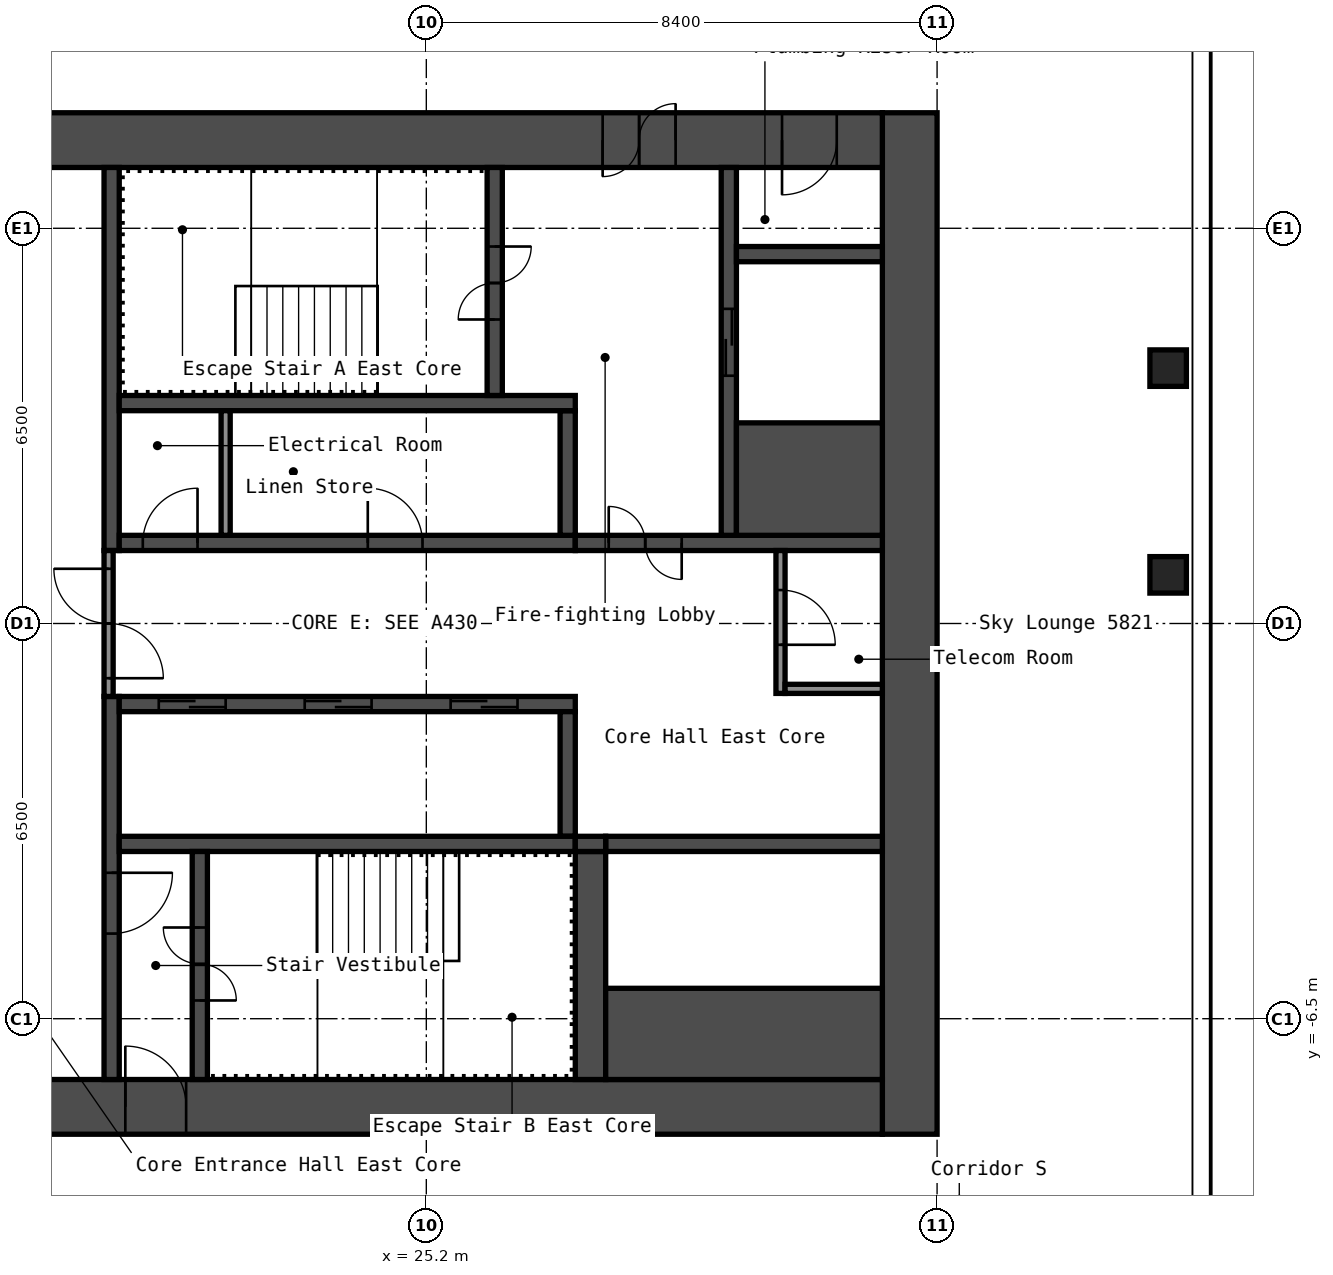
"""IFC4 building model, lengths in metres.
Left out: names, types, materials, properties, quantities, classifications, styles, units other than length and angle.
Written with IfcOpenShell. Run it as: python <this file> out.ifc"""

import sys

from ifc_helpers import new_model, si_unit, direction, frame, frame_2d, origin, origin_2d, place, context, subcontext, project, spatial, rectangle, hollow_rectangle, extrude, element, fill, save


model = new_model("IFC4")
c1 = context("Model", 3, precision=1e-05, world=origin(), true_north=direction((0.0, 1.0)))
c2 = subcontext(c1, "Body", "Model", "MODEL_VIEW")
j1 = project(units=[si_unit("LENGTHUNIT", "METRE"), si_unit("PLANEANGLEUNIT", "RADIAN")], contexts=[c1])
p1 = place(None, origin())
s1 = spatial("IfcSite", under=j1, at=p1, CompositionType="ELEMENT")
p2 = place(p1, origin())
s2 = spatial("IfcBuilding", under=s1, at=p2, CompositionType="ELEMENT")
p3 = place(p2, frame((0.0, 0.0, 205.8)))
s3 = spatial("IfcBuildingStorey", under=s2, at=p3, CompositionType="ELEMENT", Elevation=205.8)
for number, where, z_axis, x_axis in (
    (1, (37.4, 0.8, 0.0), (0.0, 0.0, 1.0), (1.0, 0.0, 0.0)),
    (2, (37.4, 4.2, 0.0), (0.0, 0.0, 1.0), (1.0, 0.0, 0.0)),
):
    element("IfcColumn", number, at=place(p3, frame(where, z_axis=z_axis, x_axis=x_axis)), inside=s3, PredefinedType="COLUMN", context=c2, shape_type="SweptSolid", body=[
        extrude(hollow_rectangle(XDim=0.6, YDim=0.6, WallThickness=0.025, InnerFilletRadius=0.038, OuterFilletRadius=0.062, at=origin_2d()), origin(), (0.0, 0.0, 1.0), 2.75),
    ])
p4 = place(p3, frame((33.15, -8.4, 0.0), z_axis=(0.0, 0.0, 1.0), x_axis=(0.0, 1.0, 0.0)))
e3 = element("IfcWall", 3, at=p4, inside=s3, PredefinedType="SHEAR", context=c2, shape_type="SweptSolid", body=[
    extrude(rectangle(XDim=16.8, YDim=0.9, at=frame_2d((8.4, 0.0))), origin(), (0.0, 0.0, 1.0), 2.75),
])
p5 = place(p3, frame((17.7, 7.95, 0.0), z_axis=(0.0, 0.0, 1.0), x_axis=(1.0, 0.0, 0.0)))
e4 = element("IfcWall", 4, at=p5, inside=s3, PredefinedType="SHEAR", context=c2, shape_type="SweptSolid", body=[
    extrude(rectangle(XDim=15.0, YDim=0.9, at=frame_2d((7.5, 0.0))), origin(), (0.0, 0.0, 1.0), 2.75),
])
p6 = place(p5, frame((10.4, 0.0, 0.0)))
e5 = element("IfcOpeningElement", 5, at=p6, cuts=e4, PredefinedType="OPENING", context=c2, shape_type="SweptSolid", body=[
    extrude(rectangle(XDim=1.2, YDim=2.1, at=frame_2d((0.6, 1.05))), frame((0.0, 0.46, 0.0), z_axis=(0.0, -1.0, 0.0), x_axis=(1.0, 0.0, 0.0)), (0.0, 0.0, 1.0), 0.92),
])
p7 = place(p5, frame((13.35, 0.0, 0.0)))
e6 = element("IfcOpeningElement", 6, at=p7, cuts=e4, PredefinedType="OPENING", context=c2, shape_type="SweptSolid", body=[
    extrude(rectangle(XDim=0.9, YDim=2.1, at=frame_2d((0.45, 1.05))), frame((0.0, 0.46, 0.0), z_axis=(0.0, -1.0, 0.0), x_axis=(1.0, 0.0, 0.0)), (0.0, 0.0, 1.0), 0.92),
])
p8 = place(p3, frame((17.7, -7.95, 0.0), z_axis=(0.0, 0.0, 1.0), x_axis=(1.0, 0.0, 0.0)))
e7 = element("IfcWall", 7, at=p8, inside=s3, PredefinedType="SHEAR", context=c2, shape_type="SweptSolid", body=[
    extrude(rectangle(XDim=15.0, YDim=0.9, at=frame_2d((7.5, 0.0))), origin(), (0.0, 0.0, 1.0), 2.75),
])
p9 = place(p8, frame((2.55, 0.0, 0.0)))
e8 = element("IfcOpeningElement", 8, at=p9, cuts=e7, PredefinedType="OPENING", context=c2, shape_type="SweptSolid", body=[
    extrude(rectangle(XDim=1.0, YDim=2.1, at=frame_2d((0.5, 1.05))), frame((0.0, 0.46, 0.0), z_axis=(0.0, -1.0, 0.0), x_axis=(1.0, 0.0, 0.0)), (0.0, 0.0, 1.0), 0.92),
])
p10 = place(p3, frame((20.025, 1.2, 0.0), z_axis=(0.0, 0.0, 1.0), x_axis=(0.0, 1.0, 0.0)))
e9 = element("IfcWall", 9, at=p10, inside=s3, PredefinedType="SHEAR", context=c2, shape_type="SweptSolid", body=[
    extrude(rectangle(XDim=6.3, YDim=0.25, at=frame_2d((3.15, 0.0))), origin(), (0.0, 0.0, 1.0), 2.75),
])
p11 = place(p3, frame((20.025, -7.5, 0.0), z_axis=(0.0, 0.0, 1.0), x_axis=(0.0, 1.0, 0.0)))
e10 = element("IfcWall", 10, at=p11, inside=s3, PredefinedType="SHEAR", context=c2, shape_type="SweptSolid", body=[
    extrude(rectangle(XDim=6.3, YDim=0.25, at=frame_2d((3.15, 0.0))), origin(), (0.0, 0.0, 1.0), 2.75),
])
p12 = place(p11, frame((2.4, 0.0, 0.0)))
e11 = element("IfcOpeningElement", 11, at=p12, cuts=e10, PredefinedType="OPENING", context=c2, shape_type="SweptSolid", body=[
    extrude(rectangle(XDim=1.0, YDim=2.1, at=frame_2d((0.5, 1.05))), frame((0.0, 0.135, 0.0), z_axis=(0.0, -1.0, 0.0), x_axis=(1.0, 0.0, 0.0)), (0.0, 0.0, 1.0), 0.27),
])
p13 = place(p3, frame((20.15, 1.325, 0.0), z_axis=(0.0, 0.0, 1.0), x_axis=(1.0, 0.0, 0.0)))
e12 = element("IfcWall", 12, at=p13, inside=s3, PredefinedType="SHEAR", context=c2, shape_type="SweptSolid", body=[
    extrude(rectangle(XDim=7.5, YDim=0.25, at=frame_2d((3.75, 0.0))), origin(), (0.0, 0.0, 1.0), 2.75),
])
p14 = place(p13, frame((0.387, 0.0, 0.0)))
e13 = element("IfcOpeningElement", 13, at=p14, cuts=e12, PredefinedType="OPENING", context=c2, shape_type="SweptSolid", body=[
    extrude(rectangle(XDim=0.9, YDim=2.1, at=frame_2d((0.45, 1.05))), frame((0.0, 0.135, 0.0), z_axis=(0.0, -1.0, 0.0), x_axis=(1.0, 0.0, 0.0)), (0.0, 0.0, 1.0), 0.27),
])
p15 = place(p13, frame((4.087, 0.0, 0.0)))
e14 = element("IfcOpeningElement", 14, at=p15, cuts=e12, PredefinedType="OPENING", context=c2, shape_type="SweptSolid", body=[
    extrude(rectangle(XDim=0.9, YDim=2.1, at=frame_2d((0.45, 1.05))), frame((0.0, 0.135, 0.0), z_axis=(0.0, -1.0, 0.0), x_axis=(1.0, 0.0, 0.0)), (0.0, 0.0, 1.0), 0.27),
])
p16 = place(p3, frame((27.525, 1.45, 0.0), z_axis=(0.0, 0.0, 1.0), x_axis=(0.0, 1.0, 0.0)))
e15 = element("IfcWall", 15, at=p16, inside=s3, PredefinedType="SHEAR", context=c2, shape_type="SweptSolid", body=[
    extrude(rectangle(XDim=2.05, YDim=0.25, at=frame_2d((1.025, 0.0))), origin(), (0.0, 0.0, 1.0), 2.75),
])
p17 = place(p3, frame((20.15, 3.625, 0.0), z_axis=(0.0, 0.0, 1.0), x_axis=(1.0, 0.0, 0.0)))
e16 = element("IfcWall", 16, at=p17, inside=s3, PredefinedType="SHEAR", context=c2, shape_type="SweptSolid", body=[
    extrude(rectangle(XDim=7.5, YDim=0.25, at=frame_2d((3.75, 0.0))), origin(), (0.0, 0.0, 1.0), 2.75),
])
p18 = place(p3, frame((26.325, 3.75, 0.0), z_axis=(0.0, 0.0, 1.0), x_axis=(0.0, 1.0, 0.0)))
e17 = element("IfcWall", 17, at=p18, inside=s3, PredefinedType="SHEAR", context=c2, shape_type="SweptSolid", body=[
    extrude(rectangle(XDim=3.75, YDim=0.25, at=frame_2d((1.875, 0.0))), origin(), (0.0, 0.0, 1.0), 2.75),
])
p19 = place(p18, frame((1.25, 0.0, 0.0)))
e18 = element("IfcOpeningElement", 18, at=p19, cuts=e17, PredefinedType="OPENING", context=c2, shape_type="SweptSolid", body=[
    extrude(rectangle(XDim=1.2, YDim=2.1, at=frame_2d((0.6, 1.05))), frame((0.0, 0.135, 0.0), z_axis=(0.0, -1.0, 0.0), x_axis=(1.0, 0.0, 0.0)), (0.0, 0.0, 1.0), 0.27),
])
p20 = place(p3, frame((27.65, 1.325, 0.0), z_axis=(0.0, 0.0, 1.0), x_axis=(1.0, 0.0, 0.0)))
e19 = element("IfcWall", 19, at=p20, inside=s3, PredefinedType="SHEAR", context=c2, shape_type="SweptSolid", body=[
    extrude(rectangle(XDim=5.05, YDim=0.25, at=frame_2d((2.525, 0.0))), origin(), (0.0, 0.0, 1.0), 2.75),
])
p21 = place(p20, frame((0.55, 0.0, 0.0)))
e20 = element("IfcOpeningElement", 20, at=p21, cuts=e19, PredefinedType="OPENING", context=c2, shape_type="SweptSolid", body=[
    extrude(rectangle(XDim=1.2, YDim=2.1, at=frame_2d((0.6, 1.05))), frame((0.0, 0.135, 0.0), z_axis=(0.0, -1.0, 0.0), x_axis=(1.0, 0.0, 0.0)), (0.0, 0.0, 1.0), 0.27),
])
p22 = place(p3, frame((30.175, 1.45, 0.0), z_axis=(0.0, 0.0, 1.0), x_axis=(0.0, 1.0, 0.0)))
e21 = element("IfcWall", 21, at=p22, inside=s3, PredefinedType="SHEAR", context=c2, shape_type="SweptSolid", body=[
    extrude(rectangle(XDim=6.05, YDim=0.25, at=frame_2d((3.025, 0.0))), origin(), (0.0, 0.0, 1.0), 2.75),
])
p23 = place(p22, frame((2.625, 0.0, 0.0)))
e22 = element("IfcOpeningElement", 22, at=p23, cuts=e21, PredefinedType="OPENING", context=c2, shape_type="SweptSolid", body=[
    extrude(rectangle(XDim=1.1, YDim=2.1, at=frame_2d((0.55, 1.05))), frame((0.0, 0.135, 0.0), z_axis=(0.0, -1.0, 0.0), x_axis=(1.0, 0.0, 0.0)), (0.0, 0.0, 1.0), 0.27),
])
p24 = place(p3, frame((30.3, 2.375, 0.0), z_axis=(0.0, 0.0, 1.0), x_axis=(1.0, 0.0, 0.0)))
e23 = element("IfcWall", 23, at=p24, inside=s3, PredefinedType="SHEAR", context=c2, shape_type="SweptSolid", body=[
    extrude(rectangle(XDim=2.4, YDim=1.85, at=frame_2d((1.2, 0.0))), origin(), (0.0, 0.0, 1.0), 2.75),
])
p25 = place(p3, frame((30.3, 6.075, 0.0), z_axis=(0.0, 0.0, 1.0), x_axis=(1.0, 0.0, 0.0)))
e24 = element("IfcWall", 24, at=p25, inside=s3, PredefinedType="SHEAR", context=c2, shape_type="SweptSolid", body=[
    extrude(rectangle(XDim=2.4, YDim=0.25, at=frame_2d((1.2, 0.0))), origin(), (0.0, 0.0, 1.0), 2.75),
])
p26 = place(p3, frame((20.15, -1.325, 0.0), z_axis=(0.0, 0.0, 1.0), x_axis=(1.0, 0.0, 0.0)))
e25 = element("IfcWall", 25, at=p26, inside=s3, PredefinedType="SHEAR", context=c2, shape_type="SweptSolid", body=[
    extrude(rectangle(XDim=7.5, YDim=0.25, at=frame_2d((3.75, 0.0))), origin(), (0.0, 0.0, 1.0), 2.75),
])
p27 = place(p26, frame((0.65, 0.0, 0.0)))
e26 = element("IfcOpeningElement", 26, at=p27, cuts=e25, PredefinedType="OPENING", context=c2, shape_type="SweptSolid", body=[
    extrude(rectangle(XDim=1.1, YDim=2.1, at=frame_2d((0.55, 1.05))), frame((0.0, 0.135, 0.0), z_axis=(0.0, -1.0, 0.0), x_axis=(1.0, 0.0, 0.0)), (0.0, 0.0, 1.0), 0.27),
])
p28 = place(p26, frame((3.05, 0.0, 0.0)))
e27 = element("IfcOpeningElement", 27, at=p28, cuts=e25, PredefinedType="OPENING", context=c2, shape_type="SweptSolid", body=[
    extrude(rectangle(XDim=1.1, YDim=2.1, at=frame_2d((0.55, 1.05))), frame((0.0, 0.135, 0.0), z_axis=(0.0, -1.0, 0.0), x_axis=(1.0, 0.0, 0.0)), (0.0, 0.0, 1.0), 0.27),
])
p29 = place(p26, frame((5.45, 0.0, 0.0)))
e28 = element("IfcOpeningElement", 28, at=p29, cuts=e25, PredefinedType="OPENING", context=c2, shape_type="SweptSolid", body=[
    extrude(rectangle(XDim=1.1, YDim=2.1, at=frame_2d((0.55, 1.05))), frame((0.0, 0.135, 0.0), z_axis=(0.0, -1.0, 0.0), x_axis=(1.0, 0.0, 0.0)), (0.0, 0.0, 1.0), 0.27),
])
p30 = place(p3, frame((27.525, -3.5, 0.0), z_axis=(0.0, 0.0, 1.0), x_axis=(0.0, 1.0, 0.0)))
e29 = element("IfcWall", 29, at=p30, inside=s3, PredefinedType="SHEAR", context=c2, shape_type="SweptSolid", body=[
    extrude(rectangle(XDim=2.05, YDim=0.25, at=frame_2d((1.025, 0.0))), origin(), (0.0, 0.0, 1.0), 2.75),
])
p31 = place(p3, frame((20.15, -3.625, 0.0), z_axis=(0.0, 0.0, 1.0), x_axis=(1.0, 0.0, 0.0)))
e30 = element("IfcWall", 30, at=p31, inside=s3, PredefinedType="SHEAR", context=c2, shape_type="SweptSolid", body=[
    extrude(rectangle(XDim=7.5, YDim=0.25, at=frame_2d((3.75, 0.0))), origin(), (0.0, 0.0, 1.0), 2.75),
])
p32 = place(p3, frame((21.475, -7.5, 0.0), z_axis=(0.0, 0.0, 1.0), x_axis=(0.0, 1.0, 0.0)))
e31 = element("IfcWall", 31, at=p32, inside=s3, PredefinedType="SHEAR", context=c2, shape_type="SweptSolid", body=[
    extrude(rectangle(XDim=3.75, YDim=0.25, at=frame_2d((1.875, 0.0))), origin(), (0.0, 0.0, 1.0), 2.75),
])
p33 = place(p32, frame((1.3, 0.0, 0.0)))
e32 = element("IfcOpeningElement", 32, at=p33, cuts=e31, PredefinedType="OPENING", context=c2, shape_type="SweptSolid", body=[
    extrude(rectangle(XDim=1.2, YDim=2.1, at=frame_2d((0.6, 1.05))), frame((0.0, 0.135, 0.0), z_axis=(0.0, -1.0, 0.0), x_axis=(1.0, 0.0, 0.0)), (0.0, 0.0, 1.0), 0.27),
])
p34 = place(p3, frame((27.9, -7.5, 0.0), z_axis=(0.0, 0.0, 1.0), x_axis=(0.0, 1.0, 0.0)))
e33 = element("IfcWall", 33, at=p34, inside=s3, PredefinedType="SHEAR", context=c2, shape_type="SweptSolid", body=[
    extrude(rectangle(XDim=3.75, YDim=0.5, at=frame_2d((1.875, 0.0))), origin(), (0.0, 0.0, 1.0), 2.75),
])
p35 = place(p3, frame((28.15, -3.625, 0.0), z_axis=(0.0, 0.0, 1.0), x_axis=(1.0, 0.0, 0.0)))
e34 = element("IfcWall", 34, at=p35, inside=s3, PredefinedType="SHEAR", context=c2, shape_type="SweptSolid", body=[
    extrude(rectangle(XDim=4.55, YDim=0.25, at=frame_2d((2.275, 0.0))), origin(), (0.0, 0.0, 1.0), 2.75),
])
p36 = place(p3, frame((28.15, -6.75, 0.0), z_axis=(0.0, 0.0, 1.0), x_axis=(1.0, 0.0, 0.0)))
e35 = element("IfcWall", 35, at=p36, inside=s3, PredefinedType="SHEAR", context=c2, shape_type="SweptSolid", body=[
    extrude(rectangle(XDim=4.55, YDim=1.5, at=frame_2d((2.275, 0.0))), origin(), (0.0, 0.0, 1.0), 2.75),
])
p37 = place(p3, frame((27.65, -3.625, 0.0), z_axis=(0.0, 0.0, 1.0), x_axis=(1.0, 0.0, 0.0)))
e36 = element("IfcWall", 36, at=p37, inside=s3, PredefinedType="SHEAR", context=c2, shape_type="SweptSolid", body=[
    extrude(rectangle(XDim=0.5, YDim=0.25, at=frame_2d((0.25, 0.0))), origin(), (0.0, 0.0, 1.0), 2.75),
])
p38 = place(p3, frame((19.975, -1.2, 0.0), z_axis=(0.0, 0.0, 1.0), x_axis=(0.0, 1.0, 0.0)))
e37 = element("IfcWall", 37, at=p38, inside=s3, PredefinedType="PARTITIONING", context=c2, shape_type="SweptSolid", body=[
    extrude(rectangle(XDim=2.4, YDim=0.15, at=frame_2d((1.2, 0.0))), origin(), (0.0, 0.0, 1.0), 2.75),
])
p39 = place(p38, frame((0.3, 0.0, 0.0)))
e38 = element("IfcOpeningElement", 38, at=p39, cuts=e37, PredefinedType="OPENING", context=c2, shape_type="SweptSolid", body=[
    extrude(rectangle(XDim=1.8, YDim=2.1, at=frame_2d((0.9, 1.05))), frame((0.0, 0.085, 0.0), z_axis=(0.0, -1.0, 0.0), x_axis=(1.0, 0.0, 0.0)), (0.0, 0.0, 1.0), 0.17),
])
p40 = place(p3, frame((31.025, -1.15, 0.0), z_axis=(0.0, 0.0, 1.0), x_axis=(0.0, 1.0, 0.0)))
e39 = element("IfcWall", 39, at=p40, inside=s3, PredefinedType="PARTITIONING", context=c2, shape_type="SweptSolid", body=[
    extrude(rectangle(XDim=2.35, YDim=0.15, at=frame_2d((1.175, 0.0))), origin(), (0.0, 0.0, 1.0), 2.75),
])
p41 = place(p40, frame((0.8, 0.0, 0.0)))
e40 = element("IfcOpeningElement", 40, at=p41, cuts=e39, PredefinedType="OPENING", context=c2, shape_type="SweptSolid", body=[
    extrude(rectangle(XDim=0.9, YDim=2.1, at=frame_2d((0.45, 1.05))), frame((0.0, 0.085, 0.0), z_axis=(0.0, -1.0, 0.0), x_axis=(1.0, 0.0, 0.0)), (0.0, 0.0, 1.0), 0.17),
])
p42 = place(p3, frame((31.1, -1.075, 0.0), z_axis=(0.0, 0.0, 1.0), x_axis=(1.0, 0.0, 0.0)))
e41 = element("IfcWall", 41, at=p42, inside=s3, PredefinedType="PARTITIONING", context=c2, shape_type="SweptSolid", body=[
    extrude(rectangle(XDim=1.6, YDim=0.15, at=frame_2d((0.8, 0.0))), origin(), (0.0, 0.0, 1.0), 2.75),
])
p43 = place(p3, frame((21.9, 1.45, 0.0), z_axis=(0.0, 0.0, 1.0), x_axis=(0.0, 1.0, 0.0)))
e42 = element("IfcWall", 42, at=p43, inside=s3, PredefinedType="PARTITIONING", context=c2, shape_type="SweptSolid", body=[
    extrude(rectangle(XDim=2.05, YDim=0.15, at=frame_2d((1.025, 0.0))), origin(), (0.0, 0.0, 1.0), 2.75),
])
p44 = place(p6, origin())
e43 = element("IfcDoor", 43, at=p44, inside=s3, OperationType="DOUBLE_DOOR_SINGLE_SWING", PredefinedType="DOOR", context=c2, shape_type="SweptSolid", body=[
    extrude(rectangle(XDim=1.2, YDim=2.1, at=frame_2d((0.6, 1.05))), frame((0.0, 0.025, 0.0), z_axis=(0.0, -1.0, 0.0), x_axis=(1.0, 0.0, 0.0)), (0.0, 0.0, 1.0), 0.05),
])
fill(e5, e43)
p45 = place(p7, origin())
e44 = element("IfcDoor", 44, at=p45, inside=s3, OperationType="SINGLE_SWING_LEFT", PredefinedType="DOOR", context=c2, shape_type="SweptSolid", body=[
    extrude(rectangle(XDim=0.9, YDim=2.1, at=frame_2d((0.45, 1.05))), frame((0.0, 0.025, 0.0), z_axis=(0.0, -1.0, 0.0), x_axis=(1.0, 0.0, 0.0)), (0.0, 0.0, 1.0), 0.05),
])
fill(e6, e44)
p46 = place(p9, origin())
e45 = element("IfcDoor", 45, at=p46, inside=s3, OperationType="SINGLE_SWING_RIGHT", PredefinedType="DOOR", context=c2, shape_type="SweptSolid", body=[
    extrude(rectangle(XDim=1.0, YDim=2.1, at=frame_2d((0.5, 1.05))), frame((0.0, 0.025, 0.0), z_axis=(0.0, -1.0, 0.0), x_axis=(1.0, 0.0, 0.0)), (0.0, 0.0, 1.0), 0.05),
])
fill(e8, e45)
p47 = place(p19, origin())
e46 = element("IfcDoor", 46, at=p47, inside=s3, OperationType="DOUBLE_DOOR_SINGLE_SWING", PredefinedType="DOOR", context=c2, shape_type="SweptSolid", body=[
    extrude(rectangle(XDim=1.2, YDim=2.1, at=frame_2d((0.6, 1.05))), frame((0.0, 0.025, 0.0), z_axis=(0.0, -1.0, 0.0), x_axis=(1.0, 0.0, 0.0)), (0.0, 0.0, 1.0), 0.05),
])
fill(e18, e46)
p48 = place(p33, origin())
e47 = element("IfcDoor", 47, at=p48, inside=s3, OperationType="DOUBLE_DOOR_SINGLE_SWING", PredefinedType="DOOR", context=c2, shape_type="SweptSolid", body=[
    extrude(rectangle(XDim=1.2, YDim=2.1, at=frame_2d((0.6, 1.05))), frame((0.0, 0.025, 0.0), z_axis=(0.0, -1.0, 0.0), x_axis=(1.0, 0.0, 0.0)), (0.0, 0.0, 1.0), 0.05),
])
fill(e32, e47)
p49 = place(p12, origin())
e48 = element("IfcDoor", 48, at=p49, inside=s3, OperationType="SINGLE_SWING_RIGHT", PredefinedType="DOOR", context=c2, shape_type="SweptSolid", body=[
    extrude(rectangle(XDim=1.0, YDim=2.1, at=frame_2d((0.5, 1.05))), frame((0.0, 0.025, 0.0), z_axis=(0.0, -1.0, 0.0), x_axis=(1.0, 0.0, 0.0)), (0.0, 0.0, 1.0), 0.05),
])
fill(e11, e48)
p50 = place(p21, origin())
e49 = element("IfcDoor", 49, at=p50, inside=s3, OperationType="DOUBLE_DOOR_SINGLE_SWING", PredefinedType="DOOR", context=c2, shape_type="SweptSolid", body=[
    extrude(rectangle(XDim=1.2, YDim=2.1, at=frame_2d((0.6, 1.05))), frame((0.0, 0.025, 0.0), z_axis=(0.0, -1.0, 0.0), x_axis=(1.0, 0.0, 0.0)), (0.0, 0.0, 1.0), 0.05),
])
fill(e20, e49)
p51 = place(p39, origin())
e50 = element("IfcDoor", 50, at=p51, inside=s3, OperationType="DOUBLE_DOOR_SINGLE_SWING", PredefinedType="DOOR", context=c2, shape_type="SweptSolid", body=[
    extrude(rectangle(XDim=1.8, YDim=2.1, at=frame_2d((0.9, 1.05))), frame((0.0, 0.025, 0.0), z_axis=(0.0, -1.0, 0.0), x_axis=(1.0, 0.0, 0.0)), (0.0, 0.0, 1.0), 0.05),
])
fill(e38, e50)
p52 = place(p41, origin())
e51 = element("IfcDoor", 51, at=p52, inside=s3, OperationType="SINGLE_SWING_LEFT", PredefinedType="DOOR", context=c2, shape_type="SweptSolid", body=[
    extrude(rectangle(XDim=0.9, YDim=2.1, at=frame_2d((0.45, 1.05))), frame((0.0, 0.025, 0.0), z_axis=(0.0, -1.0, 0.0), x_axis=(1.0, 0.0, 0.0)), (0.0, 0.0, 1.0), 0.05),
])
fill(e40, e51)
p53 = place(p14, origin())
e52 = element("IfcDoor", 52, at=p53, inside=s3, OperationType="SINGLE_SWING_LEFT", PredefinedType="DOOR", context=c2, shape_type="SweptSolid", body=[
    extrude(rectangle(XDim=0.9, YDim=2.1, at=frame_2d((0.45, 1.05))), frame((0.0, 0.025, 0.0), z_axis=(0.0, -1.0, 0.0), x_axis=(1.0, 0.0, 0.0)), (0.0, 0.0, 1.0), 0.05),
])
fill(e13, e52)
p54 = place(p15, origin())
e53 = element("IfcDoor", 53, at=p54, inside=s3, OperationType="SINGLE_SWING_RIGHT", PredefinedType="DOOR", context=c2, shape_type="SweptSolid", body=[
    extrude(rectangle(XDim=0.9, YDim=2.1, at=frame_2d((0.45, 1.05))), frame((0.0, 0.025, 0.0), z_axis=(0.0, -1.0, 0.0), x_axis=(1.0, 0.0, 0.0)), (0.0, 0.0, 1.0), 0.05),
])
fill(e14, e53)
p55 = place(p27, origin())
e54 = element("IfcDoor", 54, at=p55, inside=s3, OperationType="DOUBLE_DOOR_SLIDING", PredefinedType="DOOR", context=c2, shape_type="SweptSolid", body=[
    extrude(rectangle(XDim=1.1, YDim=2.1, at=frame_2d((0.55, 1.05))), frame((0.0, 0.025, 0.0), z_axis=(0.0, -1.0, 0.0), x_axis=(1.0, 0.0, 0.0)), (0.0, 0.0, 1.0), 0.05),
])
fill(e26, e54)
p56 = place(p28, origin())
e55 = element("IfcDoor", 55, at=p56, inside=s3, OperationType="DOUBLE_DOOR_SLIDING", PredefinedType="DOOR", context=c2, shape_type="SweptSolid", body=[
    extrude(rectangle(XDim=1.1, YDim=2.1, at=frame_2d((0.55, 1.05))), frame((0.0, 0.025, 0.0), z_axis=(0.0, -1.0, 0.0), x_axis=(1.0, 0.0, 0.0)), (0.0, 0.0, 1.0), 0.05),
])
fill(e27, e55)
p57 = place(p29, origin())
e56 = element("IfcDoor", 56, at=p57, inside=s3, OperationType="DOUBLE_DOOR_SLIDING", PredefinedType="DOOR", context=c2, shape_type="SweptSolid", body=[
    extrude(rectangle(XDim=1.1, YDim=2.1, at=frame_2d((0.55, 1.05))), frame((0.0, 0.025, 0.0), z_axis=(0.0, -1.0, 0.0), x_axis=(1.0, 0.0, 0.0)), (0.0, 0.0, 1.0), 0.05),
])
fill(e28, e56)
p58 = place(p23, origin())
e57 = element("IfcDoor", 57, at=p58, inside=s3, OperationType="DOUBLE_DOOR_SLIDING", PredefinedType="DOOR", context=c2, shape_type="SweptSolid", body=[
    extrude(rectangle(XDim=1.1, YDim=2.1, at=frame_2d((0.55, 1.05))), frame((0.0, 0.025, 0.0), z_axis=(0.0, -1.0, 0.0), x_axis=(1.0, 0.0, 0.0)), (0.0, 0.0, 1.0), 0.05),
])
fill(e22, e57)
save(model, sys.argv[1])
